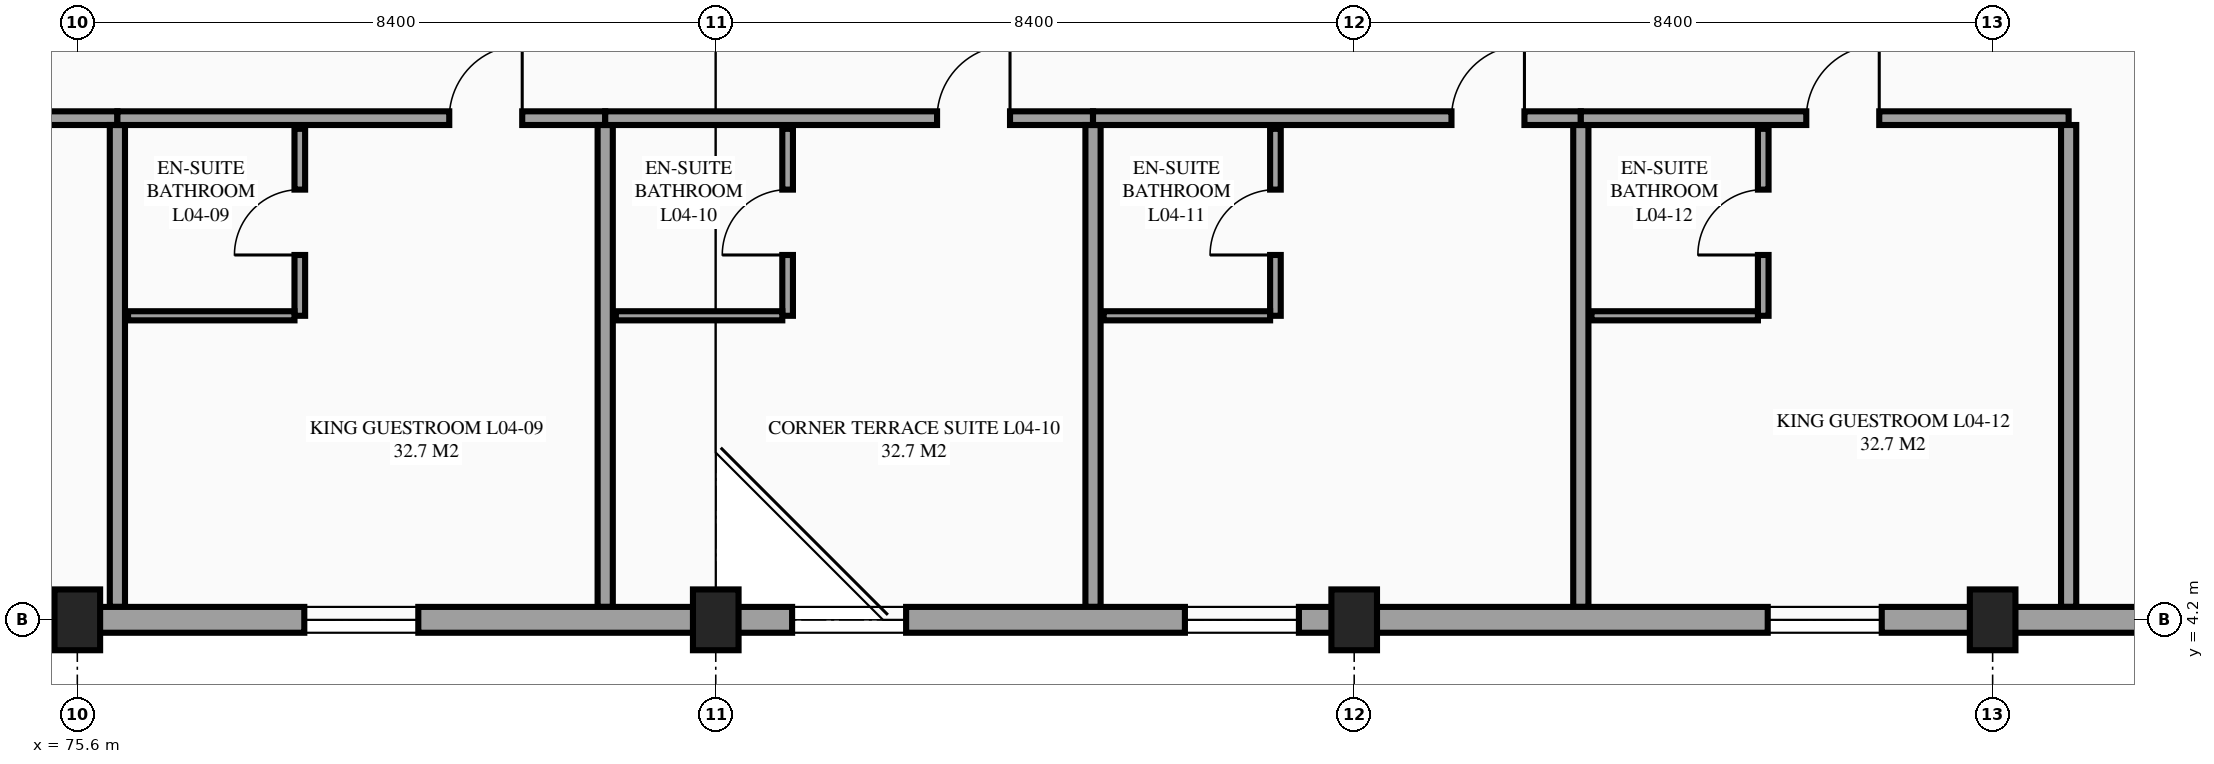
"""IFC4 building model, lengths in metres.
Left out: names, types, materials, properties, quantities, classifications, styles, units other than length and angle.
Written with IfcOpenShell. Run it as: python <this file> out.ifc"""

import sys

from ifc_helpers import new_model, si_unit, direction, frame, frame_2d, origin, origin_2d, place, context, subcontext, project, spatial, rectangle, extrude, element, fill, save


model = new_model("IFC4")
c1 = context("Model", 3, precision=1e-05, world=origin(), true_north=direction((0.0, 1.0)))
c2 = subcontext(c1, "Body", "Model", "MODEL_VIEW")
j1 = project(units=[si_unit("LENGTHUNIT", "METRE"), si_unit("PLANEANGLEUNIT", "RADIAN")], contexts=[c1])
p1 = place(None, origin())
s1 = spatial("IfcSite", under=j1, at=p1, CompositionType="ELEMENT")
p2 = place(p1, origin())
s2 = spatial("IfcBuilding", under=s1, at=p2, CompositionType="ELEMENT")
p3 = place(p2, frame((0.0, 0.0, 18.3)))
s3 = spatial("IfcBuildingStorey", under=s2, at=p3, CompositionType="ELEMENT", Elevation=18.3)
for number, where, z_axis, x_axis in (
    (1, (75.6, 4.2, 0.0), (0.0, 0.0, 1.0), (1.0, 0.0, 0.0)),
    (2, (84.0, 4.2, 0.0), (0.0, 0.0, 1.0), (1.0, 0.0, 0.0)),
    (3, (92.4, 4.2, 0.0), (0.0, 0.0, 1.0), (1.0, 0.0, 0.0)),
    (4, (100.8, 4.2, 0.0), (0.0, 0.0, 1.0), (1.0, 0.0, 0.0)),
):
    element("IfcColumn", number, at=place(p3, frame(where, z_axis=z_axis, x_axis=x_axis)), inside=s3, PredefinedType="COLUMN", context=c2, shape_type="SweptSolid", body=[
        extrude(rectangle(XDim=0.6, YDim=0.8, at=origin_2d()), origin(), (0.0, 0.0, 1.0), 3.6),
    ])
p4 = place(p3, frame((69.709, 10.8, 0.0), z_axis=(0.0, 0.0, 1.0), x_axis=(1.0, 0.0, 0.0)))
e5 = element("IfcWall", 5, at=p4, inside=s3, PredefinedType="PARTITIONING", context=c2, shape_type="SweptSolid", body=[
    extrude(rectangle(XDim=6.418, YDim=0.18, at=frame_2d((3.209, 0.0))), origin(), (0.0, 0.0, 1.0), 3.375),
])
p5 = place(p4, frame((3.666, 0.0, 0.0)))
e6 = element("IfcOpeningElement", 6, at=p5, cuts=e5, PredefinedType="OPENING", context=c2, shape_type="SweptSolid", body=[
    extrude(rectangle(XDim=0.96, YDim=2.15, at=frame_2d((0.48, 1.075))), frame((0.0, 0.1, 0.0), z_axis=(0.0, -1.0, 0.0), x_axis=(1.0, 0.0, 0.0)), (0.0, 0.0, 1.0), 0.2),
])
p6 = place(p3, frame((76.127, 4.37, 0.0), z_axis=(0.0, 0.0, 1.0), x_axis=(0.0, 1.0, 0.0)))
e7 = element("IfcWall", 7, at=p6, inside=s3, PredefinedType="PARTITIONING", context=c2, shape_type="SweptSolid", body=[
    extrude(rectangle(XDim=6.34, YDim=0.2, at=frame_2d((3.17, 0.0))), origin(), (0.0, 0.0, 1.0), 3.375),
])
p7 = place(p3, frame((76.127, 10.8, 0.0), z_axis=(0.0, 0.0, 1.0), x_axis=(1.0, 0.0, 0.0)))
e8 = element("IfcWall", 8, at=p7, inside=s3, PredefinedType="PARTITIONING", context=c2, shape_type="SweptSolid", body=[
    extrude(rectangle(XDim=6.418, YDim=0.18, at=frame_2d((3.209, 0.0))), origin(), (0.0, 0.0, 1.0), 3.375),
])
p8 = place(p7, frame((4.366, 0.0, 0.0)))
e9 = element("IfcOpeningElement", 9, at=p8, cuts=e8, PredefinedType="OPENING", context=c2, shape_type="SweptSolid", body=[
    extrude(rectangle(XDim=0.96, YDim=2.15, at=frame_2d((0.48, 1.075))), frame((0.0, 0.1, 0.0), z_axis=(0.0, -1.0, 0.0), x_axis=(1.0, 0.0, 0.0)), (0.0, 0.0, 1.0), 0.2),
])
p9 = place(p3, frame((82.545, 4.37, 0.0), z_axis=(0.0, 0.0, 1.0), x_axis=(0.0, 1.0, 0.0)))
e10 = element("IfcWall", 10, at=p9, inside=s3, PredefinedType="PARTITIONING", context=c2, shape_type="SweptSolid", body=[
    extrude(rectangle(XDim=6.34, YDim=0.2, at=frame_2d((3.17, 0.0))), origin(), (0.0, 0.0, 1.0), 3.375),
])
p10 = place(p3, frame((78.527, 8.2, 0.0), z_axis=(0.0, 0.0, 1.0), x_axis=(0.0, 1.0, 0.0)))
e11 = element("IfcWall", 11, at=p10, inside=s3, PredefinedType="PARTITIONING", context=c2, shape_type="SweptSolid", body=[
    extrude(rectangle(XDim=2.46, YDim=0.14, at=frame_2d((1.23, 0.0))), origin(), (0.0, 0.0, 1.0), 3.375),
])
p11 = place(p10, frame((0.8, 0.0, 0.0)))
e12 = element("IfcOpeningElement", 12, at=p11, cuts=e11, PredefinedType="OPENING", context=c2, shape_type="SweptSolid", body=[
    extrude(rectangle(XDim=0.86, YDim=2.1, at=frame_2d((0.43, 1.05))), frame((0.0, 0.08, 0.0), z_axis=(0.0, -1.0, 0.0), x_axis=(1.0, 0.0, 0.0)), (0.0, 0.0, 1.0), 0.16),
])
p12 = place(p3, frame((76.267, 8.2, 0.0), z_axis=(0.0, 0.0, 1.0), x_axis=(1.0, 0.0, 0.0)))
e13 = element("IfcWall", 13, at=p12, inside=s3, PredefinedType="PARTITIONING", context=c2, shape_type="SweptSolid", body=[
    extrude(rectangle(XDim=2.19, YDim=0.12, at=frame_2d((1.095, 0.0))), origin(), (0.0, 0.0, 1.0), 3.375),
])
p13 = place(p3, frame((82.545, 10.8, 0.0), z_axis=(0.0, 0.0, 1.0), x_axis=(1.0, 0.0, 0.0)))
e14 = element("IfcWall", 14, at=p13, inside=s3, PredefinedType="PARTITIONING", context=c2, shape_type="SweptSolid", body=[
    extrude(rectangle(XDim=6.418, YDim=0.18, at=frame_2d((3.209, 0.0))), origin(), (0.0, 0.0, 1.0), 3.375),
])
p14 = place(p13, frame((4.366, 0.0, 0.0)))
e15 = element("IfcOpeningElement", 15, at=p14, cuts=e14, PredefinedType="OPENING", context=c2, shape_type="SweptSolid", body=[
    extrude(rectangle(XDim=0.96, YDim=2.15, at=frame_2d((0.48, 1.075))), frame((0.0, 0.1, 0.0), z_axis=(0.0, -1.0, 0.0), x_axis=(1.0, 0.0, 0.0)), (0.0, 0.0, 1.0), 0.2),
])
p15 = place(p3, frame((88.964, 4.37, 0.0), z_axis=(0.0, 0.0, 1.0), x_axis=(0.0, 1.0, 0.0)))
e16 = element("IfcWall", 16, at=p15, inside=s3, PredefinedType="PARTITIONING", context=c2, shape_type="SweptSolid", body=[
    extrude(rectangle(XDim=6.34, YDim=0.2, at=frame_2d((3.17, 0.0))), origin(), (0.0, 0.0, 1.0), 3.375),
])
p16 = place(p3, frame((84.946, 8.2, 0.0), z_axis=(0.0, 0.0, 1.0), x_axis=(0.0, 1.0, 0.0)))
e17 = element("IfcWall", 17, at=p16, inside=s3, PredefinedType="PARTITIONING", context=c2, shape_type="SweptSolid", body=[
    extrude(rectangle(XDim=2.46, YDim=0.14, at=frame_2d((1.23, 0.0))), origin(), (0.0, 0.0, 1.0), 3.375),
])
p17 = place(p16, frame((0.8, 0.0, 0.0)))
e18 = element("IfcOpeningElement", 18, at=p17, cuts=e17, PredefinedType="OPENING", context=c2, shape_type="SweptSolid", body=[
    extrude(rectangle(XDim=0.86, YDim=2.1, at=frame_2d((0.43, 1.05))), frame((0.0, 0.08, 0.0), z_axis=(0.0, -1.0, 0.0), x_axis=(1.0, 0.0, 0.0)), (0.0, 0.0, 1.0), 0.16),
])
p18 = place(p3, frame((82.686, 8.2, 0.0), z_axis=(0.0, 0.0, 1.0), x_axis=(1.0, 0.0, 0.0)))
e19 = element("IfcWall", 19, at=p18, inside=s3, PredefinedType="PARTITIONING", context=c2, shape_type="SweptSolid", body=[
    extrude(rectangle(XDim=2.19, YDim=0.12, at=frame_2d((1.095, 0.0))), origin(), (0.0, 0.0, 1.0), 3.375),
])
p19 = place(p3, frame((88.964, 10.8, 0.0), z_axis=(0.0, 0.0, 1.0), x_axis=(1.0, 0.0, 0.0)))
e20 = element("IfcWall", 20, at=p19, inside=s3, PredefinedType="PARTITIONING", context=c2, shape_type="SweptSolid", body=[
    extrude(rectangle(XDim=6.418, YDim=0.18, at=frame_2d((3.209, 0.0))), origin(), (0.0, 0.0, 1.0), 3.375),
])
p20 = place(p19, frame((4.716, 0.0, 0.0)))
e21 = element("IfcOpeningElement", 21, at=p20, cuts=e20, PredefinedType="OPENING", context=c2, shape_type="SweptSolid", body=[
    extrude(rectangle(XDim=0.96, YDim=2.15, at=frame_2d((0.48, 1.075))), frame((0.0, 0.1, 0.0), z_axis=(0.0, -1.0, 0.0), x_axis=(1.0, 0.0, 0.0)), (0.0, 0.0, 1.0), 0.2),
])
p21 = place(p3, frame((95.382, 4.37, 0.0), z_axis=(0.0, 0.0, 1.0), x_axis=(0.0, 1.0, 0.0)))
e22 = element("IfcWall", 22, at=p21, inside=s3, PredefinedType="PARTITIONING", context=c2, shape_type="SweptSolid", body=[
    extrude(rectangle(XDim=6.34, YDim=0.2, at=frame_2d((3.17, 0.0))), origin(), (0.0, 0.0, 1.0), 3.375),
])
p22 = place(p3, frame((91.364, 8.2, 0.0), z_axis=(0.0, 0.0, 1.0), x_axis=(0.0, 1.0, 0.0)))
e23 = element("IfcWall", 23, at=p22, inside=s3, PredefinedType="PARTITIONING", context=c2, shape_type="SweptSolid", body=[
    extrude(rectangle(XDim=2.46, YDim=0.14, at=frame_2d((1.23, 0.0))), origin(), (0.0, 0.0, 1.0), 3.375),
])
p23 = place(p22, frame((0.8, 0.0, 0.0)))
e24 = element("IfcOpeningElement", 24, at=p23, cuts=e23, PredefinedType="OPENING", context=c2, shape_type="SweptSolid", body=[
    extrude(rectangle(XDim=0.86, YDim=2.1, at=frame_2d((0.43, 1.05))), frame((0.0, 0.08, 0.0), z_axis=(0.0, -1.0, 0.0), x_axis=(1.0, 0.0, 0.0)), (0.0, 0.0, 1.0), 0.16),
])
p24 = place(p3, frame((89.104, 8.2, 0.0), z_axis=(0.0, 0.0, 1.0), x_axis=(1.0, 0.0, 0.0)))
e25 = element("IfcWall", 25, at=p24, inside=s3, PredefinedType="PARTITIONING", context=c2, shape_type="SweptSolid", body=[
    extrude(rectangle(XDim=2.19, YDim=0.12, at=frame_2d((1.095, 0.0))), origin(), (0.0, 0.0, 1.0), 3.375),
])
p25 = place(p3, frame((95.382, 10.8, 0.0), z_axis=(0.0, 0.0, 1.0), x_axis=(1.0, 0.0, 0.0)))
e26 = element("IfcWall", 26, at=p25, inside=s3, PredefinedType="PARTITIONING", context=c2, shape_type="SweptSolid", body=[
    extrude(rectangle(XDim=6.418, YDim=0.18, at=frame_2d((3.209, 0.0))), origin(), (0.0, 0.0, 1.0), 3.375),
])
p26 = place(p25, frame((2.966, 0.0, 0.0)))
e27 = element("IfcOpeningElement", 27, at=p26, cuts=e26, PredefinedType="OPENING", context=c2, shape_type="SweptSolid", body=[
    extrude(rectangle(XDim=0.96, YDim=2.15, at=frame_2d((0.48, 1.075))), frame((0.0, 0.1, 0.0), z_axis=(0.0, -1.0, 0.0), x_axis=(1.0, 0.0, 0.0)), (0.0, 0.0, 1.0), 0.2),
])
p27 = place(p3, frame((101.8, 4.37, 0.0), z_axis=(0.0, 0.0, 1.0), x_axis=(0.0, 1.0, 0.0)))
e28 = element("IfcWall", 28, at=p27, inside=s3, PredefinedType="PARTITIONING", context=c2, shape_type="SweptSolid", body=[
    extrude(rectangle(XDim=6.34, YDim=0.2, at=frame_2d((3.17, 0.0))), origin(), (0.0, 0.0, 1.0), 3.375),
])
p28 = place(p3, frame((97.782, 8.2, 0.0), z_axis=(0.0, 0.0, 1.0), x_axis=(0.0, 1.0, 0.0)))
e29 = element("IfcWall", 29, at=p28, inside=s3, PredefinedType="PARTITIONING", context=c2, shape_type="SweptSolid", body=[
    extrude(rectangle(XDim=2.46, YDim=0.14, at=frame_2d((1.23, 0.0))), origin(), (0.0, 0.0, 1.0), 3.375),
])
p29 = place(p28, frame((0.8, 0.0, 0.0)))
e30 = element("IfcOpeningElement", 30, at=p29, cuts=e29, PredefinedType="OPENING", context=c2, shape_type="SweptSolid", body=[
    extrude(rectangle(XDim=0.86, YDim=2.1, at=frame_2d((0.43, 1.05))), frame((0.0, 0.08, 0.0), z_axis=(0.0, -1.0, 0.0), x_axis=(1.0, 0.0, 0.0)), (0.0, 0.0, 1.0), 0.16),
])
p30 = place(p3, frame((95.522, 8.2, 0.0), z_axis=(0.0, 0.0, 1.0), x_axis=(1.0, 0.0, 0.0)))
e31 = element("IfcWall", 31, at=p30, inside=s3, PredefinedType="PARTITIONING", context=c2, shape_type="SweptSolid", body=[
    extrude(rectangle(XDim=2.19, YDim=0.12, at=frame_2d((1.095, 0.0))), origin(), (0.0, 0.0, 1.0), 3.375),
])
p31 = place(p3, frame((67.2, 4.2, 0.0), z_axis=(0.0, 0.0, 1.0), x_axis=(1.0, 0.0, 0.0)))
e32 = element("IfcWall", 32, at=p31, inside=s3, PredefinedType="STANDARD", context=c2, shape_type="SweptSolid", body=[
    extrude(rectangle(XDim=8.4, YDim=0.34, at=frame_2d((4.2, 0.0))), origin(), (0.0, 0.0, 1.0), 2.88),
])
p32 = place(p31, frame((4.968, 0.0, 0.85)))
e33 = element("IfcOpeningElement", 33, at=p32, cuts=e32, PredefinedType="OPENING", context=c2, shape_type="SweptSolid", body=[
    extrude(rectangle(XDim=1.5, YDim=1.5, at=frame_2d((0.75, 0.75))), frame((0.0, 0.18, 0.0), z_axis=(0.0, -1.0, 0.0), x_axis=(1.0, 0.0, 0.0)), (0.0, 0.0, 1.0), 0.36),
])
p33 = place(p3, frame((75.6, 4.2, 0.0), z_axis=(0.0, 0.0, 1.0), x_axis=(1.0, 0.0, 0.0)))
e34 = element("IfcWall", 34, at=p33, inside=s3, PredefinedType="STANDARD", context=c2, shape_type="SweptSolid", body=[
    extrude(rectangle(XDim=16.8, YDim=0.34, at=frame_2d((8.4, 0.0))), origin(), (0.0, 0.0, 1.0), 2.48),
])
p34 = place(p33, frame((2.986, 0.0, 0.85)))
e35 = element("IfcOpeningElement", 35, at=p34, cuts=e34, PredefinedType="OPENING", context=c2, shape_type="SweptSolid", body=[
    extrude(rectangle(XDim=1.5, YDim=1.5, at=frame_2d((0.75, 0.75))), frame((0.0, 0.18, 0.0), z_axis=(0.0, -1.0, 0.0), x_axis=(1.0, 0.0, 0.0)), (0.0, 0.0, 1.0), 0.36),
])
p35 = place(p33, frame((9.405, 0.0, 0.85)))
e36 = element("IfcOpeningElement", 36, at=p35, cuts=e34, PredefinedType="OPENING", context=c2, shape_type="SweptSolid", body=[
    extrude(rectangle(XDim=1.5, YDim=1.5, at=frame_2d((0.75, 0.75))), frame((0.0, 0.18, 0.0), z_axis=(0.0, -1.0, 0.0), x_axis=(1.0, 0.0, 0.0)), (0.0, 0.0, 1.0), 0.36),
])
p36 = place(p33, frame((14.573, 0.0, 0.85)))
e37 = element("IfcOpeningElement", 37, at=p36, cuts=e34, PredefinedType="OPENING", context=c2, shape_type="SweptSolid", body=[
    extrude(rectangle(XDim=1.5, YDim=1.5, at=frame_2d((0.75, 0.75))), frame((0.0, 0.18, 0.0), z_axis=(0.0, -1.0, 0.0), x_axis=(1.0, 0.0, 0.0)), (0.0, 0.0, 1.0), 0.36),
])
p37 = place(p3, frame((92.4, 4.2, 0.0), z_axis=(0.0, 0.0, 1.0), x_axis=(1.0, 0.0, 0.0)))
e38 = element("IfcWall", 38, at=p37, inside=s3, PredefinedType="STANDARD", context=c2, shape_type="SweptSolid", body=[
    extrude(rectangle(XDim=8.4, YDim=0.34, at=frame_2d((4.2, 0.0))), origin(), (0.0, 0.0, 1.0), 3.075),
])
p38 = place(p37, frame((5.441, 0.0, 0.85)))
e39 = element("IfcOpeningElement", 39, at=p38, cuts=e38, PredefinedType="OPENING", context=c2, shape_type="SweptSolid", body=[
    extrude(rectangle(XDim=1.5, YDim=1.5, at=frame_2d((0.75, 0.75))), frame((0.0, 0.18, 0.0), z_axis=(0.0, -1.0, 0.0), x_axis=(1.0, 0.0, 0.0)), (0.0, 0.0, 1.0), 0.36),
])
p39 = place(p3, frame((100.8, 4.2, 0.0), z_axis=(0.0, 0.0, 1.0), x_axis=(1.0, 0.0, 0.0)))
e40 = element("IfcWall", 40, at=p39, inside=s3, PredefinedType="STANDARD", context=c2, shape_type="SweptSolid", body=[
    extrude(rectangle(XDim=8.4, YDim=0.34, at=frame_2d((4.2, 0.0))), origin(), (0.0, 0.0, 1.0), 2.53),
])
p40 = place(p34, origin())
e41 = element("IfcWindow", 41, at=p40, inside=s3, PartitioningType="SINGLE_PANEL", PredefinedType="WINDOW", context=c2, shape_type="SweptSolid", body=[
    extrude(rectangle(XDim=1.5, YDim=1.5, at=frame_2d((0.75, 0.75))), frame((0.0, 0.03, 0.0), z_axis=(0.0, -1.0, 0.0), x_axis=(1.0, 0.0, 0.0)), (0.0, 0.0, 1.0), 0.06),
])
fill(e35, e41)
p41 = place(p35, origin())
e42 = element("IfcWindow", 42, at=p41, inside=s3, PartitioningType="SINGLE_PANEL", PredefinedType="WINDOW", context=c2, shape_type="SweptSolid", body=[
    extrude(rectangle(XDim=1.5, YDim=1.5, at=frame_2d((0.75, 0.75))), frame((0.0, 0.03, 0.0), z_axis=(0.0, -1.0, 0.0), x_axis=(1.0, 0.0, 0.0)), (0.0, 0.0, 1.0), 0.06),
])
fill(e36, e42)
p42 = place(p36, origin())
e43 = element("IfcWindow", 43, at=p42, inside=s3, PartitioningType="SINGLE_PANEL", PredefinedType="WINDOW", context=c2, shape_type="SweptSolid", body=[
    extrude(rectangle(XDim=1.5, YDim=1.5, at=frame_2d((0.75, 0.75))), frame((0.0, 0.03, 0.0), z_axis=(0.0, -1.0, 0.0), x_axis=(1.0, 0.0, 0.0)), (0.0, 0.0, 1.0), 0.06),
])
fill(e37, e43)
p43 = place(p38, origin())
e44 = element("IfcWindow", 44, at=p43, inside=s3, PartitioningType="SINGLE_PANEL", PredefinedType="WINDOW", context=c2, shape_type="SweptSolid", body=[
    extrude(rectangle(XDim=1.5, YDim=1.5, at=frame_2d((0.75, 0.75))), frame((0.0, 0.03, 0.0), z_axis=(0.0, -1.0, 0.0), x_axis=(1.0, 0.0, 0.0)), (0.0, 0.0, 1.0), 0.06),
])
fill(e39, e44)
p44 = place(p8, origin())
e45 = element("IfcDoor", 45, at=p44, inside=s3, OperationType="SINGLE_SWING_RIGHT", PredefinedType="DOOR", context=c2, shape_type="SweptSolid", body=[
    extrude(rectangle(XDim=0.96, YDim=2.15, at=frame_2d((0.48, 1.075))), frame((0.0, 0.025, 0.0), z_axis=(0.0, -1.0, 0.0), x_axis=(1.0, 0.0, 0.0)), (0.0, 0.0, 1.0), 0.05),
])
fill(e9, e45)
p45 = place(p11, origin())
e46 = element("IfcDoor", 46, at=p45, inside=s3, OperationType="SINGLE_SWING_LEFT", PredefinedType="DOOR", context=c2, shape_type="SweptSolid", body=[
    extrude(rectangle(XDim=0.86, YDim=2.1, at=frame_2d((0.43, 1.05))), frame((0.0, 0.025, 0.0), z_axis=(0.0, -1.0, 0.0), x_axis=(1.0, 0.0, 0.0)), (0.0, 0.0, 1.0), 0.05),
])
fill(e12, e46)
p46 = place(p14, origin())
e47 = element("IfcDoor", 47, at=p46, inside=s3, OperationType="SINGLE_SWING_RIGHT", PredefinedType="DOOR", context=c2, shape_type="SweptSolid", body=[
    extrude(rectangle(XDim=0.96, YDim=2.15, at=frame_2d((0.48, 1.075))), frame((0.0, 0.025, 0.0), z_axis=(0.0, -1.0, 0.0), x_axis=(1.0, 0.0, 0.0)), (0.0, 0.0, 1.0), 0.05),
])
fill(e15, e47)
p47 = place(p17, origin())
e48 = element("IfcDoor", 48, at=p47, inside=s3, OperationType="SINGLE_SWING_LEFT", PredefinedType="DOOR", context=c2, shape_type="SweptSolid", body=[
    extrude(rectangle(XDim=0.86, YDim=2.1, at=frame_2d((0.43, 1.05))), frame((0.0, 0.025, 0.0), z_axis=(0.0, -1.0, 0.0), x_axis=(1.0, 0.0, 0.0)), (0.0, 0.0, 1.0), 0.05),
])
fill(e18, e48)
p48 = place(p20, origin())
e49 = element("IfcDoor", 49, at=p48, inside=s3, OperationType="SINGLE_SWING_RIGHT", PredefinedType="DOOR", context=c2, shape_type="SweptSolid", body=[
    extrude(rectangle(XDim=0.96, YDim=2.15, at=frame_2d((0.48, 1.075))), frame((0.0, 0.025, 0.0), z_axis=(0.0, -1.0, 0.0), x_axis=(1.0, 0.0, 0.0)), (0.0, 0.0, 1.0), 0.05),
])
fill(e21, e49)
p49 = place(p23, origin())
e50 = element("IfcDoor", 50, at=p49, inside=s3, OperationType="SINGLE_SWING_LEFT", PredefinedType="DOOR", context=c2, shape_type="SweptSolid", body=[
    extrude(rectangle(XDim=0.86, YDim=2.1, at=frame_2d((0.43, 1.05))), frame((0.0, 0.025, 0.0), z_axis=(0.0, -1.0, 0.0), x_axis=(1.0, 0.0, 0.0)), (0.0, 0.0, 1.0), 0.05),
])
fill(e24, e50)
p50 = place(p26, origin())
e51 = element("IfcDoor", 51, at=p50, inside=s3, OperationType="SINGLE_SWING_RIGHT", PredefinedType="DOOR", context=c2, shape_type="SweptSolid", body=[
    extrude(rectangle(XDim=0.96, YDim=2.15, at=frame_2d((0.48, 1.075))), frame((0.0, 0.025, 0.0), z_axis=(0.0, -1.0, 0.0), x_axis=(1.0, 0.0, 0.0)), (0.0, 0.0, 1.0), 0.05),
])
fill(e27, e51)
p51 = place(p29, origin())
e52 = element("IfcDoor", 52, at=p51, inside=s3, OperationType="SINGLE_SWING_LEFT", PredefinedType="DOOR", context=c2, shape_type="SweptSolid", body=[
    extrude(rectangle(XDim=0.86, YDim=2.1, at=frame_2d((0.43, 1.05))), frame((0.0, 0.025, 0.0), z_axis=(0.0, -1.0, 0.0), x_axis=(1.0, 0.0, 0.0)), (0.0, 0.0, 1.0), 0.05),
])
fill(e30, e52)
save(model, sys.argv[1])
